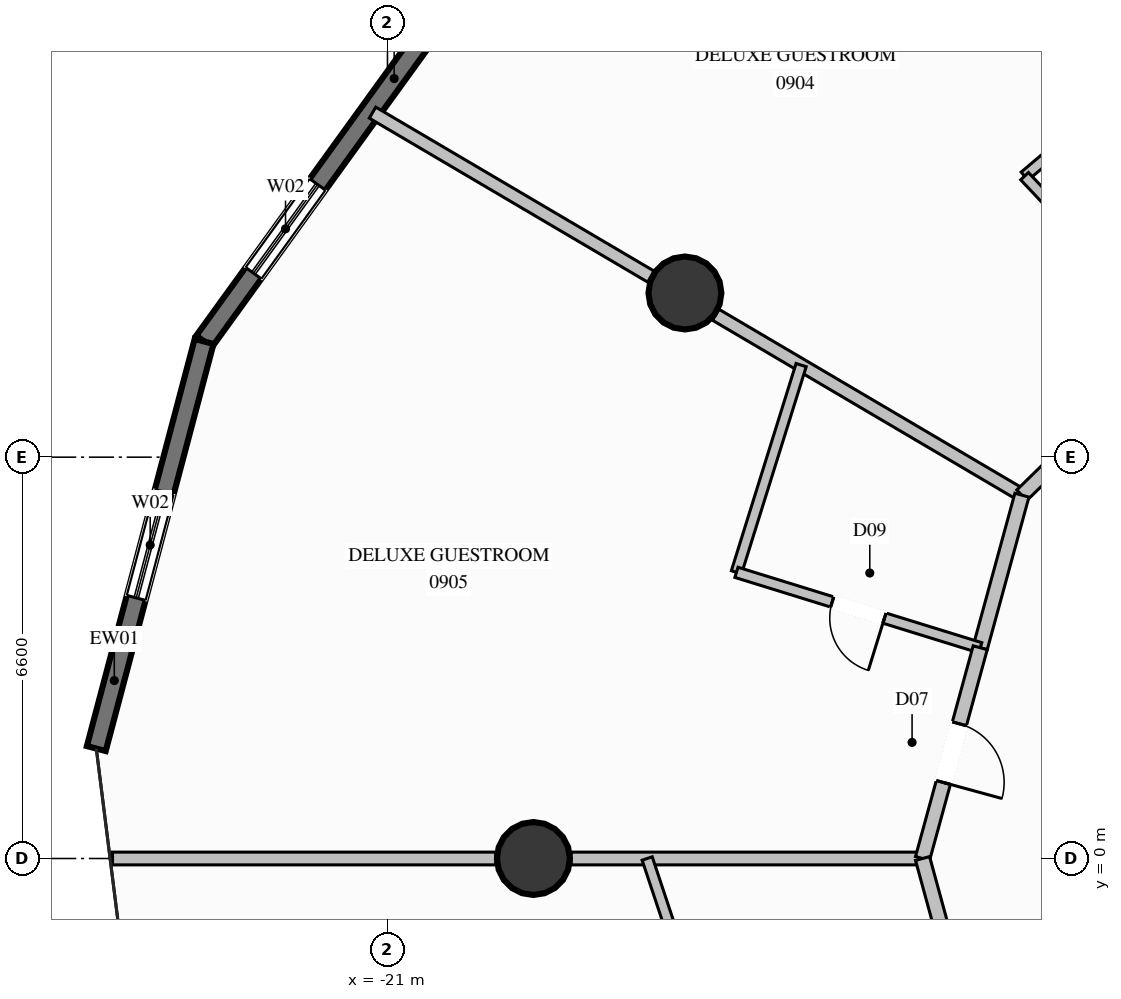
"""IFC4 building model, lengths in metres.
Left out: names, types, materials, properties, quantities, classifications, styles, units other than length and angle.
Written with IfcOpenShell. Run it as: python <this file> out.ifc"""

import sys

from ifc_helpers import new_model, si_unit, direction, frame, frame_2d, origin, origin_2d, place, context, subcontext, project, spatial, rectangle, circle, extrude, element, fill, save


model = new_model("IFC4")
c1 = context("Model", 3, precision=1e-05, world=origin(), true_north=direction((0.0, 1.0)))
c2 = subcontext(c1, "Body", "Model", "MODEL_VIEW")
j1 = project(units=[si_unit("LENGTHUNIT", "METRE"), si_unit("PLANEANGLEUNIT", "RADIAN")], contexts=[c1])
p1 = place(None, origin())
s1 = spatial("IfcSite", under=j1, at=p1, CompositionType="ELEMENT")
p2 = place(p1, origin())
s2 = spatial("IfcBuilding", under=s1, at=p2, CompositionType="ELEMENT")
p3 = place(p2, frame((0.0, 0.0, 35.6)))
s3 = spatial("IfcBuildingStorey", under=s2, at=p3, CompositionType="ELEMENT", Elevation=35.6)
for number, where, z_axis, x_axis in (
    (1, (-16.108, 9.3, 0.0), (0.0, 0.0, 1.0), (1.0, 0.0, 0.0)),
    (2, (-18.6, 0.0, 0.0), (0.0, 0.0, 1.0), (1.0, 0.0, 0.0)),
):
    element("IfcColumn", number, at=place(p3, frame(where, z_axis=z_axis, x_axis=x_axis)), inside=s3, PredefinedType="COLUMN", context=c2, shape_type="SweptSolid", body=[
        extrude(circle(Radius=0.6, at=origin_2d()), origin(), (0.0, 0.0, 1.0), 3.6),
    ])
p4 = place(p3, frame((-24.016, 8.503, 0.0), z_axis=(0.0, 0.0, 1.0), x_axis=(0.585883584877, 0.810395227634, 0.0)))
e3 = element("IfcWall", 3, at=p4, inside=s3, PredefinedType="SOLIDWALL", context=c2, shape_type="SweptSolid", body=[
    extrude(rectangle(XDim=7.234, YDim=0.32, at=frame_2d((3.617, 0.0))), origin(), (0.0, 0.0, 1.0), 3.34),
])
p5 = place(p4, frame((1.386, 0.0, 0.35)))
e4 = element("IfcOpeningElement", 4, at=p5, cuts=e3, PredefinedType="OPENING", context=c2, shape_type="SweptSolid", body=[
    extrude(rectangle(XDim=1.8, YDim=2.6, at=frame_2d((0.9, 1.3))), frame((0.0, 0.17, 0.0), z_axis=(0.0, -1.0, 0.0), x_axis=(1.0, 0.0, 0.0)), (0.0, 0.0, 1.0), 0.34),
])
p6 = place(p3, frame((-25.789, 1.808, 0.0), z_axis=(0.0, 0.0, 1.0), x_axis=(0.255999140835, 0.966677009084, 0.0)))
e5 = element("IfcWall", 5, at=p6, inside=s3, PredefinedType="SOLIDWALL", context=c2, shape_type="SweptSolid", body=[
    extrude(rectangle(XDim=6.926, YDim=0.32, at=frame_2d((3.463, 0.0))), origin(), (0.0, 0.0, 1.0), 3.34),
])
p7 = place(p6, frame((2.563, 0.0, 0.35)))
e6 = element("IfcOpeningElement", 6, at=p7, cuts=e5, PredefinedType="OPENING", context=c2, shape_type="SweptSolid", body=[
    extrude(rectangle(XDim=1.8, YDim=2.6, at=frame_2d((0.9, 1.3))), frame((0.0, 0.17, 0.0), z_axis=(0.0, -1.0, 0.0), x_axis=(1.0, 0.0, 0.0)), (0.0, 0.0, 1.0), 0.34),
])
p8 = place(p3, frame((-10.566, 5.975, 0.0), z_axis=(0.0, 0.0, 1.0), x_axis=(-0.86160761681, 0.507574935014, 0.0)))
e7 = element("IfcWall", 7, at=p8, inside=s3, PredefinedType="PARTITIONING", context=c2, shape_type="SweptSolid", body=[
    extrude(rectangle(XDim=5.845, YDim=0.21, at=frame_2d((2.922, 0.0))), origin(), (0.0, 0.0, 1.0), 2.707),
])
p9 = place(p3, frame((-16.667, 9.569, 0.0), z_axis=(0.0, 0.0, 1.0), x_axis=(-0.861651827739, 0.50749987956, 0.0)))
e8 = element("IfcWall", 8, at=p9, inside=s3, PredefinedType="PARTITIONING", context=c2, shape_type="SweptSolid", body=[
    extrude(rectangle(XDim=5.314, YDim=0.21, at=frame_2d((2.657, 0.0))), origin(), (0.0, 0.0, 1.0), 3.34),
])
p10 = place(p3, frame((-12.2, 0.0, 0.0), z_axis=(0.0, 0.0, 1.0), x_axis=(-1.0, 0.0, 0.0)))
e9 = element("IfcWall", 9, at=p10, inside=s3, PredefinedType="PARTITIONING", context=c2, shape_type="SweptSolid", body=[
    extrude(rectangle(XDim=5.78, YDim=0.21, at=frame_2d((2.89, 0.0))), origin(), (0.0, 0.0, 1.0), 2.707),
])
p11 = place(p3, frame((-19.22, 0.0, 0.0), z_axis=(0.0, 0.0, 1.0), x_axis=(-1.0, 0.0, 0.0)))
e10 = element("IfcWall", 10, at=p11, inside=s3, PredefinedType="PARTITIONING", context=c2, shape_type="SweptSolid", body=[
    extrude(rectangle(XDim=6.302, YDim=0.21, at=frame_2d((3.151, 0.0))), origin(), (0.0, 0.0, 1.0), 3.34),
])
p12 = place(p3, frame((-7.86, 13.471, 0.0), z_axis=(0.0, 0.0, 1.0), x_axis=(-0.763718302061, -0.645549653471, 0.0)))
e11 = element("IfcWall", 11, at=p12, inside=s3, PredefinedType="PLUMBINGWALL", context=c2, shape_type="SweptSolid", body=[
    extrude(rectangle(XDim=3.485, YDim=0.175, at=frame_2d((1.743, 0.0))), origin(), (0.0, 0.0, 1.0), 3.34),
])
p13 = place(p3, frame((-7.976, 8.512, 0.0), z_axis=(0.0, 0.0, 1.0), x_axis=(-0.684831906404, 0.72870107724, 0.0)))
e12 = element("IfcWall", 12, at=p13, inside=s3, PredefinedType="PLUMBINGWALL", context=c2, shape_type="SweptSolid", body=[
    extrude(rectangle(XDim=3.718, YDim=0.175, at=frame_2d((1.859, 0.0))), origin(), (0.0, 0.0, 1.0), 3.34),
])
p14 = place(p13, frame((1.409, 0.0, 0.0)))
e13 = element("IfcOpeningElement", 13, at=p14, cuts=e12, PredefinedType="OPENING", context=c2, shape_type="SweptSolid", body=[
    extrude(rectangle(XDim=0.9, YDim=2.1, at=frame_2d((0.45, 1.05))), frame((0.0, 0.098, 0.0), z_axis=(0.0, -1.0, 0.0), x_axis=(1.0, 0.0, 0.0)), (0.0, 0.0, 1.0), 0.195),
])
p15 = place(p3, frame((-7.976, 8.512, 0.0), z_axis=(0.0, 0.0, 1.0), x_axis=(-0.714375756875, -0.699762301064, 0.0)))
e14 = element("IfcWall", 14, at=p15, inside=s3, PredefinedType="PARTITIONING", context=c2, shape_type="SweptSolid", body=[
    extrude(rectangle(XDim=3.625, YDim=0.24, at=frame_2d((1.812, 0.0))), origin(), (0.0, 0.0, 1.0), 3.34),
])
p16 = place(p15, frame((1.313, 0.0, 0.0)))
e15 = element("IfcOpeningElement", 15, at=p16, cuts=e14, PredefinedType="OPENING", context=c2, shape_type="SweptSolid", body=[
    extrude(rectangle(XDim=1.0, YDim=2.2, at=frame_2d((0.5, 1.1))), frame((0.0, 0.13, 0.0), z_axis=(0.0, -1.0, 0.0), x_axis=(1.0, 0.0, 0.0)), (0.0, 0.0, 1.0), 0.26),
])
p17 = place(p3, frame((-10.566, 5.975, 0.0), z_axis=(0.0, 0.0, 1.0), x_axis=(-0.263744763784, -0.964592504416, 0.0)))
e16 = element("IfcWall", 16, at=p17, inside=s3, PredefinedType="PARTITIONING", context=c2, shape_type="SweptSolid", body=[
    extrude(rectangle(XDim=2.601, YDim=0.24, at=frame_2d((1.301, 0.0))), origin(), (0.0, 0.0, 1.0), 3.34),
])
p18 = place(p3, frame((-14.197, 8.114, 0.0), z_axis=(0.0, 0.0, 1.0), x_axis=(-0.298014103634, -0.954561466871, 0.0)))
e17 = element("IfcWall", 17, at=p18, inside=s3, PredefinedType="PLUMBINGWALL", context=c2, shape_type="SweptSolid", body=[
    extrude(rectangle(XDim=3.57, YDim=0.175, at=frame_2d((1.785, 0.0))), origin(), (0.0, 0.0, 1.0), 3.34),
])
p19 = place(p3, frame((-11.252, 3.466, 0.0), z_axis=(0.0, 0.0, 1.0), x_axis=(-0.955346516927, 0.295487787557, 0.0)))
e18 = element("IfcWall", 18, at=p19, inside=s3, PredefinedType="PLUMBINGWALL", context=c2, shape_type="SweptSolid", body=[
    extrude(rectangle(XDim=4.197, YDim=0.175, at=frame_2d((2.098, 0.0))), origin(), (0.0, 0.0, 1.0), 3.34),
])
p20 = place(p19, frame((1.648, 0.0, 0.0)))
e19 = element("IfcOpeningElement", 19, at=p20, cuts=e18, PredefinedType="OPENING", context=c2, shape_type="SweptSolid", body=[
    extrude(rectangle(XDim=0.9, YDim=2.1, at=frame_2d((0.45, 1.05))), frame((0.0, 0.098, 0.0), z_axis=(0.0, -1.0, 0.0), x_axis=(1.0, 0.0, 0.0)), (0.0, 0.0, 1.0), 0.195),
])
p21 = place(p3, frame((-11.252, 3.466, 0.0), z_axis=(0.0, 0.0, 1.0), x_axis=(-0.263818706543, -0.96457228349, 0.0)))
e20 = element("IfcWall", 20, at=p21, inside=s3, PredefinedType="PARTITIONING", context=c2, shape_type="SweptSolid", body=[
    extrude(rectangle(XDim=3.593, YDim=0.24, at=frame_2d((1.797, 0.0))), origin(), (0.0, 0.0, 1.0), 3.34),
])
p22 = place(p21, frame((1.297, 0.0, 0.0)))
e21 = element("IfcOpeningElement", 21, at=p22, cuts=e20, PredefinedType="OPENING", context=c2, shape_type="SweptSolid", body=[
    extrude(rectangle(XDim=1.0, YDim=2.2, at=frame_2d((0.5, 1.1))), frame((0.0, 0.13, 0.0), z_axis=(0.0, -1.0, 0.0), x_axis=(1.0, 0.0, 0.0)), (0.0, 0.0, 1.0), 0.26),
])
p23 = place(p3, frame((-12.2, 0.0, 0.0), z_axis=(0.0, 0.0, 1.0), x_axis=(0.263744763784, -0.964592504416, 0.0)))
e22 = element("IfcWall", 22, at=p23, inside=s3, PredefinedType="PARTITIONING", context=c2, shape_type="SweptSolid", body=[
    extrude(rectangle(XDim=2.601, YDim=0.24, at=frame_2d((1.301, 0.0))), origin(), (0.0, 0.0, 1.0), 3.34),
])
p24 = place(p3, frame((-16.729, 0.0, 0.0), z_axis=(0.0, 0.0, 1.0), x_axis=(0.315898114113, -0.948793118388, 0.0)))
e23 = element("IfcWall", 23, at=p24, inside=s3, PredefinedType="PLUMBINGWALL", context=c2, shape_type="SweptSolid", body=[
    extrude(rectangle(XDim=3.555, YDim=0.175, at=frame_2d((1.778, 0.0))), origin(), (0.0, 0.0, 1.0), 3.34),
])
p25 = place(p5, origin())
e24 = element("IfcWindow", 24, at=p25, inside=s3, PartitioningType="SINGLE_PANEL", PredefinedType="WINDOW", context=c2, shape_type="SweptSolid", body=[
    extrude(rectangle(XDim=1.8, YDim=2.6, at=frame_2d((0.9, 1.3))), frame((0.0, 0.03, 0.0), z_axis=(0.0, -1.0, 0.0), x_axis=(1.0, 0.0, 0.0)), (0.0, 0.0, 1.0), 0.06),
])
fill(e4, e24)
p26 = place(p7, origin())
e25 = element("IfcWindow", 25, at=p26, inside=s3, PartitioningType="SINGLE_PANEL", PredefinedType="WINDOW", context=c2, shape_type="SweptSolid", body=[
    extrude(rectangle(XDim=1.8, YDim=2.6, at=frame_2d((0.9, 1.3))), frame((0.0, 0.03, 0.0), z_axis=(0.0, -1.0, 0.0), x_axis=(1.0, 0.0, 0.0)), (0.0, 0.0, 1.0), 0.06),
])
fill(e6, e25)
p27 = place(p20, origin())
e26 = element("IfcDoor", 26, at=p27, inside=s3, OperationType="SINGLE_SWING_LEFT", PredefinedType="DOOR", context=c2, shape_type="SweptSolid", body=[
    extrude(rectangle(XDim=0.9, YDim=2.1, at=frame_2d((0.45, 1.05))), frame((0.0, 0.025, 0.0), z_axis=(0.0, -1.0, 0.0), x_axis=(1.0, 0.0, 0.0)), (0.0, 0.0, 1.0), 0.05),
])
fill(e19, e26)
p28 = place(p22, origin())
e27 = element("IfcDoor", 27, at=p28, inside=s3, OperationType="SINGLE_SWING_RIGHT", PredefinedType="DOOR", context=c2, shape_type="SweptSolid", body=[
    extrude(rectangle(XDim=1.0, YDim=2.2, at=frame_2d((0.5, 1.1))), frame((0.0, 0.025, 0.0), z_axis=(0.0, -1.0, 0.0), x_axis=(1.0, 0.0, 0.0)), (0.0, 0.0, 1.0), 0.05),
])
fill(e21, e27)
save(model, sys.argv[1])
